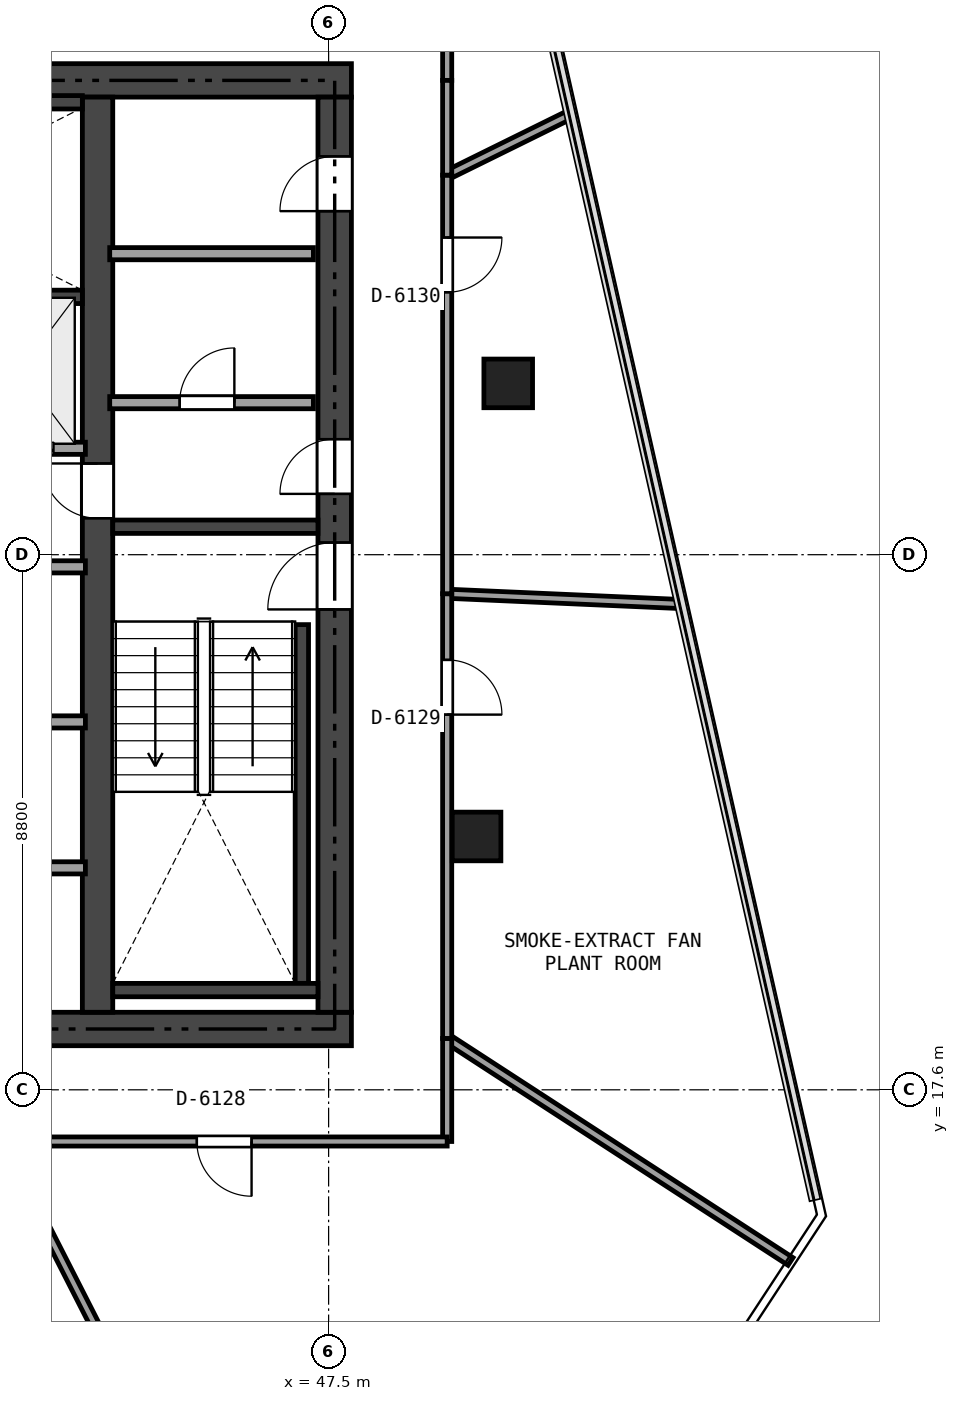
"""IFC4 building model, lengths in metres.
Left out: names, types, materials, properties, quantities, classifications, styles, units other than length and angle.
Written with IfcOpenShell. Run it as: python <this file> out.ifc"""

import sys

from ifc_helpers import new_model, si_unit, direction, frame, frame_2d, origin, origin_2d, place, context, subcontext, project, spatial, rectangle, extrude, element, fill, save


model = new_model("IFC4")
c1 = context("Model", 3, precision=1e-05, world=origin(), true_north=direction((0.0, 1.0)))
c2 = subcontext(c1, "Body", "Model", "MODEL_VIEW")
j1 = project(units=[si_unit("LENGTHUNIT", "METRE"), si_unit("PLANEANGLEUNIT", "RADIAN")], contexts=[c1])
p1 = place(None, origin())
s1 = spatial("IfcSite", under=j1, at=p1, CompositionType="ELEMENT")
p2 = place(p1, origin())
s2 = spatial("IfcBuilding", under=s1, at=p2, CompositionType="ELEMENT")
p3 = place(p2, frame((0.0, 0.0, 228.3)))
s3 = spatial("IfcBuildingStorey", under=s2, at=p3, CompositionType="ELEMENT", Elevation=228.3)
p4 = place(p3, frame((26.525, 18.6, 0.0), z_axis=(0.0, 0.0, 1.0), x_axis=(1.0, 0.0, 0.0)))
e1 = element("IfcWall", 1, at=p4, inside=s3, PredefinedType="SHEAR", context=c2, shape_type="SweptSolid", body=[
    extrude(rectangle(XDim=21.35, YDim=0.55, at=frame_2d((10.675, 0.0))), origin(), (0.0, 0.0, 1.0), 3.24),
])
p5 = place(p4, frame((12.4, 0.0, 0.0)))
e2 = element("IfcOpeningElement", 2, at=p5, cuts=e1, PredefinedType="OPENING", context=c2, shape_type="SweptSolid", body=[
    extrude(rectangle(XDim=1.15, YDim=2.15, at=frame_2d((0.575, 1.075))), frame((0.0, 0.285, 0.0), z_axis=(0.0, -1.0, 0.0), x_axis=(1.0, 0.0, 0.0)), (0.0, 0.0, 1.0), 0.57),
])
p6 = place(p4, frame((5.225, 0.0, 0.0)))
e3 = element("IfcOpeningElement", 3, at=p6, cuts=e1, PredefinedType="OPENING", context=c2, shape_type="SweptSolid", body=[
    extrude(rectangle(XDim=0.9, YDim=2.1, at=frame_2d((0.45, 1.05))), frame((0.0, 0.285, 0.0), z_axis=(0.0, -1.0, 0.0), x_axis=(1.0, 0.0, 0.0)), (0.0, 0.0, 1.0), 0.57),
])
p7 = place(p3, frame((26.525, 34.2, 0.0), z_axis=(0.0, 0.0, 1.0), x_axis=(1.0, 0.0, 0.0)))
e4 = element("IfcWall", 4, at=p7, inside=s3, PredefinedType="SHEAR", context=c2, shape_type="SweptSolid", body=[
    extrude(rectangle(XDim=21.35, YDim=0.55, at=frame_2d((10.675, 0.0))), origin(), (0.0, 0.0, 1.0), 3.24),
])
p8 = place(p7, frame((9.675, 0.0, 0.0)))
e5 = element("IfcOpeningElement", 5, at=p8, cuts=e4, PredefinedType="OPENING", context=c2, shape_type="SweptSolid", body=[
    extrude(rectangle(XDim=1.1, YDim=2.15, at=frame_2d((0.55, 1.075))), frame((0.0, 0.285, 0.0), z_axis=(0.0, -1.0, 0.0), x_axis=(1.0, 0.0, 0.0)), (0.0, 0.0, 1.0), 0.57),
])
p9 = place(p7, frame((1.925, 0.0, 0.0)))
e6 = element("IfcOpeningElement", 6, at=p9, cuts=e4, PredefinedType="OPENING", context=c2, shape_type="SweptSolid", body=[
    extrude(rectangle(XDim=0.9, YDim=2.1, at=frame_2d((0.45, 1.05))), frame((0.0, 0.285, 0.0), z_axis=(0.0, -1.0, 0.0), x_axis=(1.0, 0.0, 0.0)), (0.0, 0.0, 1.0), 0.57),
])
p10 = place(p7, frame((6.225, 0.0, 0.0)))
e7 = element("IfcOpeningElement", 7, at=p10, cuts=e4, PredefinedType="OPENING", context=c2, shape_type="SweptSolid", body=[
    extrude(rectangle(XDim=0.9, YDim=2.1, at=frame_2d((0.45, 1.05))), frame((0.0, 0.285, 0.0), z_axis=(0.0, -1.0, 0.0), x_axis=(1.0, 0.0, 0.0)), (0.0, 0.0, 1.0), 0.57),
])
p11 = place(p3, frame((47.6, 18.875, 0.0), z_axis=(0.0, 0.0, 1.0), x_axis=(0.0, 1.0, 0.0)))
e8 = element("IfcWall", 8, at=p11, inside=s3, PredefinedType="SHEAR", context=c2, shape_type="SweptSolid", body=[
    extrude(rectangle(XDim=15.05, YDim=0.55, at=frame_2d((7.525, 0.0))), origin(), (0.0, 0.0, 1.0), 3.24),
])
p12 = place(p11, frame((6.625, 0.0, 0.0)))
e9 = element("IfcOpeningElement", 9, at=p12, cuts=e8, PredefinedType="OPENING", context=c2, shape_type="SweptSolid", body=[
    extrude(rectangle(XDim=1.1, YDim=2.15, at=frame_2d((0.55, 1.075))), frame((0.0, 0.285, 0.0), z_axis=(0.0, -1.0, 0.0), x_axis=(1.0, 0.0, 0.0)), (0.0, 0.0, 1.0), 0.57),
])
p13 = place(p11, frame((8.525, 0.0, 0.0)))
e10 = element("IfcOpeningElement", 10, at=p13, cuts=e8, PredefinedType="OPENING", context=c2, shape_type="SweptSolid", body=[
    extrude(rectangle(XDim=0.9, YDim=2.1, at=frame_2d((0.45, 1.05))), frame((0.0, 0.285, 0.0), z_axis=(0.0, -1.0, 0.0), x_axis=(1.0, 0.0, 0.0)), (0.0, 0.0, 1.0), 0.57),
])
p14 = place(p11, frame((13.175, 0.0, 0.0)))
e11 = element("IfcOpeningElement", 11, at=p14, cuts=e8, PredefinedType="OPENING", context=c2, shape_type="SweptSolid", body=[
    extrude(rectangle(XDim=0.9, YDim=2.1, at=frame_2d((0.45, 1.05))), frame((0.0, 0.285, 0.0), z_axis=(0.0, -1.0, 0.0), x_axis=(1.0, 0.0, 0.0)), (0.0, 0.0, 1.0), 0.57),
])
p15 = place(p3, frame((43.7, 18.875, 0.0), z_axis=(0.0, 0.0, 1.0), x_axis=(0.0, 1.0, 0.0)))
e12 = element("IfcWall", 12, at=p15, inside=s3, PredefinedType="SHEAR", context=c2, shape_type="SweptSolid", body=[
    extrude(rectangle(XDim=15.05, YDim=0.5, at=frame_2d((7.525, 0.0))), origin(), (0.0, 0.0, 1.0), 3.24),
])
p16 = place(p15, frame((8.125, 0.0, 0.0)))
e13 = element("IfcOpeningElement", 13, at=p16, cuts=e12, PredefinedType="OPENING", context=c2, shape_type="SweptSolid", body=[
    extrude(rectangle(XDim=0.9, YDim=2.1, at=frame_2d((0.45, 1.05))), frame((0.0, 0.26, 0.0), z_axis=(0.0, -1.0, 0.0), x_axis=(1.0, 0.0, 0.0)), (0.0, 0.0, 1.0), 0.52),
])
p17 = place(p3, frame((43.95, 26.86, 0.0), z_axis=(0.0, 0.0, 1.0), x_axis=(1.0, 0.0, 0.0)))
e14 = element("IfcWall", 14, at=p17, inside=s3, PredefinedType="SHEAR", context=c2, shape_type="SweptSolid", body=[
    extrude(rectangle(XDim=3.375, YDim=0.22, at=frame_2d((1.688, 0.0))), origin(), (0.0, 0.0, 1.0), 3.24),
])
p18 = place(p3, frame((47.06, 19.35, 0.0), z_axis=(0.0, 0.0, 1.0), x_axis=(0.0, 1.0, 0.0)))
e15 = element("IfcWall", 15, at=p18, inside=s3, PredefinedType="SHEAR", context=c2, shape_type="SweptSolid", body=[
    extrude(rectangle(XDim=5.9, YDim=0.22, at=frame_2d((2.95, 0.0))), origin(), (0.0, 0.0, 1.0), 3.24),
])
p19 = place(p3, frame((43.95, 19.24, 0.0), z_axis=(0.0, 0.0, 1.0), x_axis=(1.0, 0.0, 0.0)))
e16 = element("IfcWall", 16, at=p19, inside=s3, PredefinedType="SHEAR", context=c2, shape_type="SweptSolid", body=[
    extrude(rectangle(XDim=3.375, YDim=0.22, at=frame_2d((1.688, 0.0))), origin(), (0.0, 0.0, 1.0), 3.24),
])
p20 = place(p3, frame((35.84, 30.64, 0.0), z_axis=(0.0, 0.0, 1.0), x_axis=(1.0, 0.0, 0.0)))
e17 = element("IfcWall", 17, at=p20, inside=s3, PredefinedType="SHEAR", context=c2, shape_type="SweptSolid", body=[
    extrude(rectangle(XDim=7.61, YDim=0.22, at=frame_2d((3.805, 0.0))), origin(), (0.0, 0.0, 1.0), 3.24),
])
p21 = place(p3, frame((37.55, 33.84, 0.0), z_axis=(0.0, 0.0, 1.0), x_axis=(1.0, 0.0, 0.0)))
e18 = element("IfcWall", 18, at=p21, inside=s3, PredefinedType="SHEAR", context=c2, shape_type="SweptSolid", body=[
    extrude(rectangle(XDim=5.9, YDim=0.22, at=frame_2d((2.95, 0.0))), origin(), (0.0, 0.0, 1.0), 3.24),
])
for number, where, z_axis, x_axis in (
    (19, (50.454, 29.217, -0.345), (0.0, 0.0, 1.0), (1.0, 0.0, 0.0)),
    (20, (49.933, 21.766, -0.345), (0.0, 0.0, 1.0), (1.0, 0.0, 0.0)),
):
    element("IfcColumn", number, at=place(p3, frame(where, z_axis=z_axis, x_axis=x_axis)), inside=s3, PredefinedType="COLUMN", context=c2, shape_type="SweptSolid", body=[
        extrude(rectangle(XDim=0.8, YDim=0.8, at=origin_2d()), origin(), (0.0, 0.0, 1.0), 3.585),
    ])
p22 = place(p3, frame((43.9, 28.9, 0.0), z_axis=(0.0, 0.0, 1.0), x_axis=(1.0, 0.0, 0.0)))
e21 = element("IfcWall", 21, at=p22, inside=s3, PredefinedType="SOLIDWALL", context=c2, shape_type="SweptSolid", body=[
    extrude(rectangle(XDim=3.35, YDim=0.2, at=frame_2d((1.675, 0.0))), origin(), (0.0, 0.0, 1.0), 3.24),
])
p23 = place(p22, frame((1.15, 0.0, 0.0)))
e22 = element("IfcOpeningElement", 22, at=p23, cuts=e21, PredefinedType="OPENING", context=c2, shape_type="SweptSolid", body=[
    extrude(rectangle(XDim=0.9, YDim=2.1, at=frame_2d((0.45, 1.05))), frame((0.0, 0.11, 0.0), z_axis=(0.0, -1.0, 0.0), x_axis=(1.0, 0.0, 0.0)), (0.0, 0.0, 1.0), 0.22),
])
p24 = place(p3, frame((43.9, 31.35, 0.0), z_axis=(0.0, 0.0, 1.0), x_axis=(1.0, 0.0, 0.0)))
e23 = element("IfcWall", 23, at=p24, inside=s3, PredefinedType="SOLIDWALL", context=c2, shape_type="SweptSolid", body=[
    extrude(rectangle(XDim=3.35, YDim=0.2, at=frame_2d((1.675, 0.0))), origin(), (0.0, 0.0, 1.0), 2.913),
])
p25 = place(p3, frame((35.62, 28.15, 0.0), z_axis=(0.0, 0.0, 1.0), x_axis=(1.0, 0.0, 0.0)))
e24 = element("IfcWall", 24, at=p25, inside=s3, PredefinedType="SOLIDWALL", context=c2, shape_type="SweptSolid", body=[
    extrude(rectangle(XDim=7.88, YDim=0.2, at=frame_2d((3.94, 0.0))), origin(), (0.0, 0.0, 1.0), 3.24),
])
p26 = place(p25, frame((0.405, 0.0, 0.0)))
e25 = element("IfcOpeningElement", 25, at=p26, cuts=e24, PredefinedType="OPENING", context=c2, shape_type="SweptSolid", body=[
    extrude(rectangle(XDim=1.1, YDim=2.15, at=frame_2d((0.55, 1.075))), frame((0.0, 0.11, 0.0), z_axis=(0.0, -1.0, 0.0), x_axis=(1.0, 0.0, 0.0)), (0.0, 0.0, 1.0), 0.22),
])
p27 = place(p25, frame((2.355, 0.0, 0.0)))
e26 = element("IfcOpeningElement", 26, at=p27, cuts=e24, PredefinedType="OPENING", context=c2, shape_type="SweptSolid", body=[
    extrude(rectangle(XDim=1.1, YDim=2.15, at=frame_2d((0.55, 1.075))), frame((0.0, 0.11, 0.0), z_axis=(0.0, -1.0, 0.0), x_axis=(1.0, 0.0, 0.0)), (0.0, 0.0, 1.0), 0.22),
])
p28 = place(p25, frame((4.305, 0.0, 0.0)))
e27 = element("IfcOpeningElement", 27, at=p28, cuts=e24, PredefinedType="OPENING", context=c2, shape_type="SweptSolid", body=[
    extrude(rectangle(XDim=1.1, YDim=2.15, at=frame_2d((0.55, 1.075))), frame((0.0, 0.11, 0.0), z_axis=(0.0, -1.0, 0.0), x_axis=(1.0, 0.0, 0.0)), (0.0, 0.0, 1.0), 0.22),
])
p29 = place(p25, frame((6.255, 0.0, 0.0)))
e28 = element("IfcOpeningElement", 28, at=p29, cuts=e24, PredefinedType="OPENING", context=c2, shape_type="SweptSolid", body=[
    extrude(rectangle(XDim=1.1, YDim=2.15, at=frame_2d((0.55, 1.075))), frame((0.0, 0.11, 0.0), z_axis=(0.0, -1.0, 0.0), x_axis=(1.0, 0.0, 0.0)), (0.0, 0.0, 1.0), 0.22),
])
p30 = place(p3, frame((35.62, 26.2, 0.0), z_axis=(0.0, 0.0, 1.0), x_axis=(1.0, 0.0, 0.0)))
e29 = element("IfcWall", 29, at=p30, inside=s3, PredefinedType="SOLIDWALL", context=c2, shape_type="SweptSolid", body=[
    extrude(rectangle(XDim=7.88, YDim=0.2, at=frame_2d((3.94, 0.0))), origin(), (0.0, 0.0, 1.0), 3.24),
])
p31 = place(p30, frame((1.13, 0.0, 0.0)))
e30 = element("IfcOpeningElement", 30, at=p31, cuts=e29, PredefinedType="OPENING", context=c2, shape_type="SweptSolid", body=[
    extrude(rectangle(XDim=0.9, YDim=2.1, at=frame_2d((0.45, 1.05))), frame((0.0, 0.11, 0.0), z_axis=(0.0, -1.0, 0.0), x_axis=(1.0, 0.0, 0.0)), (0.0, 0.0, 1.0), 0.22),
])
p32 = place(p30, frame((5.73, 0.0, 0.0)))
e31 = element("IfcOpeningElement", 31, at=p32, cuts=e29, PredefinedType="OPENING", context=c2, shape_type="SweptSolid", body=[
    extrude(rectangle(XDim=0.9, YDim=2.1, at=frame_2d((0.45, 1.05))), frame((0.0, 0.11, 0.0), z_axis=(0.0, -1.0, 0.0), x_axis=(1.0, 0.0, 0.0)), (0.0, 0.0, 1.0), 0.22),
])
p33 = place(p3, frame((35.62, 23.65, 0.0), z_axis=(0.0, 0.0, 1.0), x_axis=(1.0, 0.0, 0.0)))
e32 = element("IfcWall", 32, at=p33, inside=s3, PredefinedType="SOLIDWALL", context=c2, shape_type="SweptSolid", body=[
    extrude(rectangle(XDim=7.88, YDim=0.2, at=frame_2d((3.94, 0.0))), origin(), (0.0, 0.0, 1.0), 2.761),
])
p34 = place(p3, frame((35.62, 21.25, 0.0), z_axis=(0.0, 0.0, 1.0), x_axis=(1.0, 0.0, 0.0)))
e33 = element("IfcWall", 33, at=p34, inside=s3, PredefinedType="SOLIDWALL", context=c2, shape_type="SweptSolid", body=[
    extrude(rectangle(XDim=7.88, YDim=0.2, at=frame_2d((3.94, 0.0))), origin(), (0.0, 0.0, 1.0), 3.24),
])
p35 = place(p34, frame((1.13, 0.0, 0.0)))
e34 = element("IfcOpeningElement", 34, at=p35, cuts=e33, PredefinedType="OPENING", context=c2, shape_type="SweptSolid", body=[
    extrude(rectangle(XDim=0.9, YDim=2.1, at=frame_2d((0.45, 1.05))), frame((0.0, 0.11, 0.0), z_axis=(0.0, -1.0, 0.0), x_axis=(1.0, 0.0, 0.0)), (0.0, 0.0, 1.0), 0.22),
])
p36 = place(p34, frame((5.73, 0.0, 0.0)))
e35 = element("IfcOpeningElement", 35, at=p36, cuts=e33, PredefinedType="OPENING", context=c2, shape_type="SweptSolid", body=[
    extrude(rectangle(XDim=0.9, YDim=2.1, at=frame_2d((0.45, 1.05))), frame((0.0, 0.11, 0.0), z_axis=(0.0, -1.0, 0.0), x_axis=(1.0, 0.0, 0.0)), (0.0, 0.0, 1.0), 0.22),
])
p37 = place(p3, frame((46.895, 7.379, 0.0), z_axis=(0.0, 0.0, 1.0), x_axis=(-0.454236932896, 0.890880917291, 0.0)))
e36 = element("IfcWall", 36, at=p37, inside=s3, PredefinedType="PARTITIONING", context=c2, shape_type="SweptSolid", body=[
    extrude(rectangle(XDim=10.519, YDim=0.15, at=frame_2d((5.259, 0.0))), origin(), (0.0, 0.0, 1.0), 2.765),
])
p38 = place(p3, frame((55.097, 14.777, 0.0), z_axis=(0.0, 0.0, 1.0), x_axis=(-0.838617529297, 0.544720698667, 0.0)))
e37 = element("IfcWall", 37, at=p38, inside=s3, PredefinedType="PARTITIONING", context=c2, shape_type="SweptSolid", body=[
    extrude(rectangle(XDim=6.734, YDim=0.15, at=frame_2d((3.367, 0.0))), origin(), (0.0, 0.0, 1.0), 3.24),
])
p39 = place(p3, frame((49.45, 18.445, 0.0), z_axis=(0.0, 0.0, 1.0), x_axis=(0.0, -1.0, 0.0)))
e38 = element("IfcWall", 38, at=p39, inside=s3, PredefinedType="PARTITIONING", context=c2, shape_type="SweptSolid", body=[
    extrude(rectangle(XDim=1.695, YDim=0.15, at=frame_2d((0.848, 0.0))), origin(), (0.0, 0.0, 1.0), 3.24),
])
p40 = place(p3, frame((49.45, 16.75, 0.0), z_axis=(0.0, 0.0, 1.0), x_axis=(-1.0, 0.0, 0.0)))
e39 = element("IfcWall", 39, at=p40, inside=s3, PredefinedType="PARTITIONING", context=c2, shape_type="SweptSolid", body=[
    extrude(rectangle(XDim=7.333, YDim=0.15, at=frame_2d((3.667, 0.0))), origin(), (0.0, 0.0, 1.0), 2.765),
])
p41 = place(p40, frame((3.217, 0.0, 0.0)))
e40 = element("IfcOpeningElement", 40, at=p41, cuts=e39, PredefinedType="OPENING", context=c2, shape_type="SweptSolid", body=[
    extrude(rectangle(XDim=0.9, YDim=2.0, at=frame_2d((0.45, 1.0))), frame((0.0, 0.085, 0.0), z_axis=(0.0, -1.0, 0.0), x_axis=(1.0, 0.0, 0.0)), (0.0, 0.0, 1.0), 0.17),
])
p42 = place(p3, frame((53.33, 25.587, 0.0), z_axis=(0.0, 0.0, 1.0), x_axis=(-0.999028682624, 0.044064626346, 0.0)))
e41 = element("IfcWall", 41, at=p42, inside=s3, PredefinedType="PARTITIONING", context=c2, shape_type="SweptSolid", body=[
    extrude(rectangle(XDim=3.884, YDim=0.15, at=frame_2d((1.942, 0.0))), origin(), (0.0, 0.0, 1.0), 2.765),
])
p43 = place(p3, frame((49.45, 25.758, 0.0), z_axis=(0.0, 0.0, 1.0), x_axis=(0.0, -1.0, 0.0)))
e42 = element("IfcWall", 42, at=p43, inside=s3, PredefinedType="PARTITIONING", context=c2, shape_type="SweptSolid", body=[
    extrude(rectangle(XDim=7.313, YDim=0.15, at=frame_2d((3.656, 0.0))), origin(), (0.0, 0.0, 1.0), 2.689),
])
p44 = place(p43, frame((1.088, 0.0, 0.0)))
e43 = element("IfcOpeningElement", 43, at=p44, cuts=e42, PredefinedType="OPENING", context=c2, shape_type="SweptSolid", body=[
    extrude(rectangle(XDim=0.9, YDim=2.0, at=frame_2d((0.45, 1.0))), frame((0.0, 0.085, 0.0), z_axis=(0.0, -1.0, 0.0), x_axis=(1.0, 0.0, 0.0)), (0.0, 0.0, 1.0), 0.17),
])
p45 = place(p3, frame((51.508, 33.657, 0.0), z_axis=(0.0, 0.0, 1.0), x_axis=(-0.89688185474, -0.442270209983, 0.0)))
e44 = element("IfcWall", 44, at=p45, inside=s3, PredefinedType="PARTITIONING", context=c2, shape_type="SweptSolid", body=[
    extrude(rectangle(XDim=2.295, YDim=0.15, at=frame_2d((1.147, 0.0))), origin(), (0.0, 0.0, 1.0), 3.24),
])
p46 = place(p3, frame((49.45, 32.642, 0.0), z_axis=(0.0, 0.0, 1.0), x_axis=(0.0, -1.0, 0.0)))
e45 = element("IfcWall", 45, at=p46, inside=s3, PredefinedType="PARTITIONING", context=c2, shape_type="SweptSolid", body=[
    extrude(rectangle(XDim=6.884, YDim=0.15, at=frame_2d((3.442, 0.0))), origin(), (0.0, 0.0, 1.0), 2.689),
])
p47 = place(p46, frame((1.026, 0.0, 0.0)))
e46 = element("IfcOpeningElement", 46, at=p47, cuts=e45, PredefinedType="OPENING", context=c2, shape_type="SweptSolid", body=[
    extrude(rectangle(XDim=0.9, YDim=2.0, at=frame_2d((0.45, 1.0))), frame((0.0, 0.085, 0.0), z_axis=(0.0, -1.0, 0.0), x_axis=(1.0, 0.0, 0.0)), (0.0, 0.0, 1.0), 0.17),
])
p48 = place(p3, frame((49.45, 36.05, 0.0), z_axis=(0.0, 0.0, 1.0), x_axis=(0.0, -1.0, 0.0)))
e47 = element("IfcWall", 47, at=p48, inside=s3, PredefinedType="PARTITIONING", context=c2, shape_type="SweptSolid", body=[
    extrude(rectangle(XDim=1.85, YDim=0.15, at=frame_2d((0.925, 0.0))), origin(), (0.0, 0.0, 1.0), 3.24),
])
p49 = place(p3, frame((49.45, 34.2, 0.0), z_axis=(0.0, 0.0, 1.0), x_axis=(0.0, -1.0, 0.0)))
e48 = element("IfcWall", 48, at=p49, inside=s3, PredefinedType="PARTITIONING", context=c2, shape_type="SweptSolid", body=[
    extrude(rectangle(XDim=1.558, YDim=0.15, at=frame_2d((0.779, 0.0))), origin(), (0.0, 0.0, 1.0), 3.24),
])
p50 = place(p12, origin())
e49 = element("IfcDoor", 49, at=p50, inside=s3, OperationType="SINGLE_SWING_LEFT", PredefinedType="DOOR", context=c2, shape_type="SweptSolid", body=[
    extrude(rectangle(XDim=1.1, YDim=2.15, at=frame_2d((0.55, 1.075))), frame((0.0, 0.025, 0.0), z_axis=(0.0, -1.0, 0.0), x_axis=(1.0, 0.0, 0.0)), (0.0, 0.0, 1.0), 0.05),
])
fill(e9, e49)
p51 = place(p16, origin())
e50 = element("IfcDoor", 50, at=p51, inside=s3, OperationType="SINGLE_SWING_RIGHT", PredefinedType="DOOR", context=c2, shape_type="SweptSolid", body=[
    extrude(rectangle(XDim=0.9, YDim=2.1, at=frame_2d((0.45, 1.05))), frame((0.0, 0.025, 0.0), z_axis=(0.0, -1.0, 0.0), x_axis=(1.0, 0.0, 0.0)), (0.0, 0.0, 1.0), 0.05),
])
fill(e13, e50)
p52 = place(p13, origin())
e51 = element("IfcDoor", 51, at=p52, inside=s3, OperationType="SINGLE_SWING_LEFT", PredefinedType="DOOR", context=c2, shape_type="SweptSolid", body=[
    extrude(rectangle(XDim=0.9, YDim=2.1, at=frame_2d((0.45, 1.05))), frame((0.0, 0.025, 0.0), z_axis=(0.0, -1.0, 0.0), x_axis=(1.0, 0.0, 0.0)), (0.0, 0.0, 1.0), 0.05),
])
fill(e10, e51)
p53 = place(p23, origin())
e52 = element("IfcDoor", 52, at=p53, inside=s3, OperationType="SINGLE_SWING_RIGHT", PredefinedType="DOOR", context=c2, shape_type="SweptSolid", body=[
    extrude(rectangle(XDim=0.9, YDim=2.1, at=frame_2d((0.45, 1.05))), frame((0.0, 0.025, 0.0), z_axis=(0.0, -1.0, 0.0), x_axis=(1.0, 0.0, 0.0)), (0.0, 0.0, 1.0), 0.05),
])
fill(e22, e52)
p54 = place(p14, origin())
e53 = element("IfcDoor", 53, at=p54, inside=s3, OperationType="SINGLE_SWING_LEFT", PredefinedType="DOOR", context=c2, shape_type="SweptSolid", body=[
    extrude(rectangle(XDim=0.9, YDim=2.1, at=frame_2d((0.45, 1.05))), frame((0.0, 0.025, 0.0), z_axis=(0.0, -1.0, 0.0), x_axis=(1.0, 0.0, 0.0)), (0.0, 0.0, 1.0), 0.05),
])
fill(e11, e53)
p55 = place(p29, origin())
e54 = element("IfcDoor", 54, at=p55, inside=s3, OperationType="SLIDING_TO_LEFT", PredefinedType="DOOR", context=c2, shape_type="SweptSolid", body=[
    extrude(rectangle(XDim=1.1, YDim=2.15, at=frame_2d((0.55, 1.075))), frame((0.0, 0.025, 0.0), z_axis=(0.0, -1.0, 0.0), x_axis=(1.0, 0.0, 0.0)), (0.0, 0.0, 1.0), 0.05),
])
fill(e28, e54)
p56 = place(p41, origin())
e55 = element("IfcDoor", 55, at=p56, inside=s3, OperationType="SINGLE_SWING_LEFT", PredefinedType="DOOR", context=c2, shape_type="SweptSolid", body=[
    extrude(rectangle(XDim=0.9, YDim=2.0, at=frame_2d((0.45, 1.0))), frame((0.0, 0.025, 0.0), z_axis=(0.0, -1.0, 0.0), x_axis=(1.0, 0.0, 0.0)), (0.0, 0.0, 1.0), 0.05),
])
fill(e40, e55)
p57 = place(p44, origin())
e56 = element("IfcDoor", 56, at=p57, inside=s3, OperationType="SINGLE_SWING_RIGHT", PredefinedType="DOOR", context=c2, shape_type="SweptSolid", body=[
    extrude(rectangle(XDim=0.9, YDim=2.0, at=frame_2d((0.45, 1.0))), frame((0.0, 0.025, 0.0), z_axis=(0.0, -1.0, 0.0), x_axis=(1.0, 0.0, 0.0)), (0.0, 0.0, 1.0), 0.05),
])
fill(e43, e56)
p58 = place(p47, origin())
e57 = element("IfcDoor", 57, at=p58, inside=s3, OperationType="SINGLE_SWING_LEFT", PredefinedType="DOOR", context=c2, shape_type="SweptSolid", body=[
    extrude(rectangle(XDim=0.9, YDim=2.0, at=frame_2d((0.45, 1.0))), frame((0.0, 0.025, 0.0), z_axis=(0.0, -1.0, 0.0), x_axis=(1.0, 0.0, 0.0)), (0.0, 0.0, 1.0), 0.05),
])
fill(e46, e57)
save(model, sys.argv[1])
